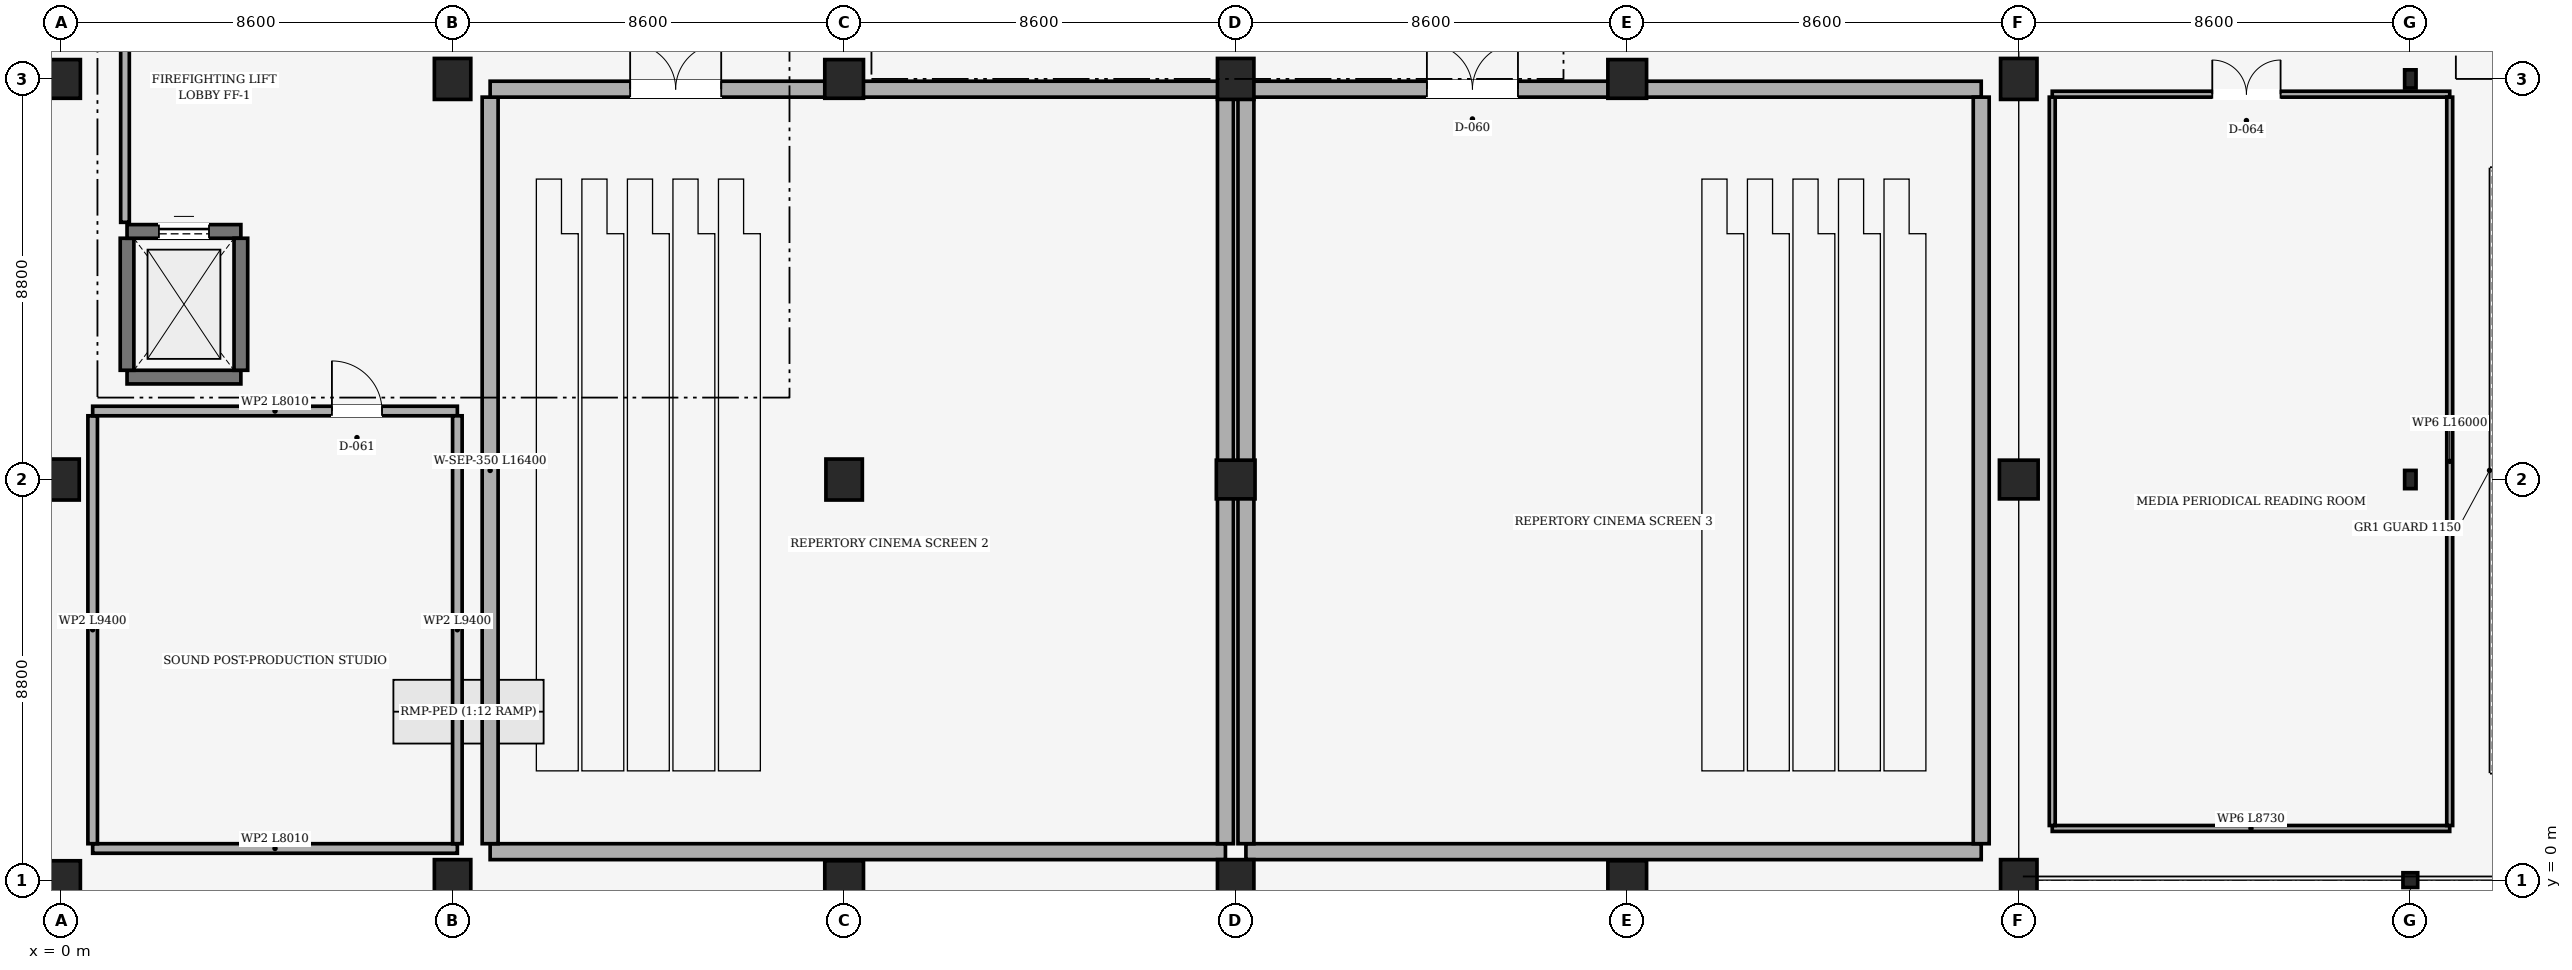
"""IFC4 building model, lengths in metres.
Left out: names, types, materials, properties, quantities, classifications, styles, units other than length and angle.
Written with IfcOpenShell. Run it as: python <this file> out.ifc"""

import sys

from ifc_helpers import new_model, si_unit, direction, frame, frame_2d, origin, origin_with_axes, origin_2d, place, context, subcontext, project, spatial, rectangle, hollow_circle, i_section, extrude, element, fill, save


model = new_model("IFC4")
c1 = context("Model", 3, precision=1e-05, world=origin(), true_north=direction((0.0, 1.0)))
c2 = subcontext(c1, "Body", "Model", "MODEL_VIEW")
j1 = project(units=[si_unit("LENGTHUNIT", "METRE"), si_unit("PLANEANGLEUNIT", "RADIAN")], contexts=[c1])
p1 = place(None, origin())
s1 = spatial("IfcSite", under=j1, at=p1, CompositionType="ELEMENT")
p2 = place(p1, origin())
s2 = spatial("IfcBuilding", under=s1, at=p2, CompositionType="ELEMENT")
p3 = place(p2, frame((0.0, 0.0, 4.5)))
s3 = spatial("IfcBuildingStorey", under=s2, at=p3, CompositionType="ELEMENT", Elevation=4.5)
p4 = place(p3, origin_with_axes())
e1 = element("IfcColumn", 1, at=p4, inside=s3, PredefinedType="COLUMN", context=c2, shape_type="SweptSolid", body=[
    extrude(rectangle(XDim=0.85, YDim=0.85, at=origin_2d()), origin(), (0.0, 0.0, 1.0), 3.65),
])
p5 = place(p3, frame((0.0, 8.8, 0.0), z_axis=(0.0, 0.0, 1.0), x_axis=(1.0, 0.0, 0.0)))
e2 = element("IfcColumn", 2, at=p5, inside=s3, PredefinedType="COLUMN", context=c2, shape_type="SweptSolid", body=[
    extrude(rectangle(XDim=0.8, YDim=0.9, at=origin_2d()), origin(), (0.0, 0.0, 1.0), 3.65),
])
p6 = place(p3, frame((0.0, 17.6, 0.0), z_axis=(0.0, 0.0, 1.0), x_axis=(1.0, 0.0, 0.0)))
e3 = element("IfcColumn", 3, at=p6, inside=s3, PredefinedType="COLUMN", context=c2, shape_type="SweptSolid", body=[
    extrude(rectangle(XDim=0.85, YDim=0.85, at=origin_2d()), origin(), (0.0, 0.0, 1.0), 3.65),
])
for number, where, z_axis, x_axis in (
    (4, (8.6, 0.0, 0.0), (0.0, 0.0, 1.0), (1.0, 0.0, 0.0)),
    (5, (8.6, 17.6, 0.0), (0.0, 0.0, 1.0), (1.0, 0.0, 0.0)),
):
    element("IfcColumn", number, at=place(p3, frame(where, z_axis=z_axis, x_axis=x_axis)), inside=s3, PredefinedType="COLUMN", context=c2, shape_type="SweptSolid", body=[
        extrude(rectangle(XDim=0.8, YDim=0.9, at=origin_2d()), origin(), (0.0, 0.0, 1.0), 3.65),
    ])
p7 = place(p3, frame((17.2, 0.0, 0.0), z_axis=(0.0, 0.0, 1.0), x_axis=(1.0, 0.0, 0.0)))
e6 = element("IfcColumn", 6, at=p7, inside=s3, PredefinedType="COLUMN", context=c2, shape_type="SweptSolid", body=[
    extrude(rectangle(XDim=0.85, YDim=0.85, at=origin_2d()), origin(), (0.0, 0.0, 1.0), 3.65),
])
p8 = place(p3, frame((17.2, 8.8, 0.0), z_axis=(0.0, 0.0, 1.0), x_axis=(1.0, 0.0, 0.0)))
e7 = element("IfcColumn", 7, at=p8, inside=s3, PredefinedType="COLUMN", context=c2, shape_type="SweptSolid", body=[
    extrude(rectangle(XDim=0.8, YDim=0.9, at=origin_2d()), origin(), (0.0, 0.0, 1.0), 3.65),
])
p9 = place(p3, frame((17.2, 17.6, 0.0), z_axis=(0.0, 0.0, 1.0), x_axis=(1.0, 0.0, 0.0)))
e8 = element("IfcColumn", 8, at=p9, inside=s3, PredefinedType="COLUMN", context=c2, shape_type="SweptSolid", body=[
    extrude(rectangle(XDim=0.85, YDim=0.85, at=origin_2d()), origin(), (0.0, 0.0, 1.0), 3.65),
])
p10 = place(p3, frame((25.8, 0.0, 0.0), z_axis=(0.0, 0.0, 1.0), x_axis=(1.0, 0.0, 0.0)))
e9 = element("IfcColumn", 9, at=p10, inside=s3, PredefinedType="COLUMN", context=c2, shape_type="SweptSolid", body=[
    extrude(rectangle(XDim=0.8, YDim=0.9, at=origin_2d()), origin(), (0.0, 0.0, 1.0), 3.65),
])
p11 = place(p3, frame((25.8, 8.8, 0.0), z_axis=(0.0, 0.0, 1.0), x_axis=(1.0, 0.0, 0.0)))
e10 = element("IfcColumn", 10, at=p11, inside=s3, PredefinedType="COLUMN", context=c2, shape_type="SweptSolid", body=[
    extrude(rectangle(XDim=0.85, YDim=0.85, at=origin_2d()), origin(), (0.0, 0.0, 1.0), 3.65),
])
p12 = place(p3, frame((25.8, 17.6, 0.0), z_axis=(0.0, 0.0, 1.0), x_axis=(1.0, 0.0, 0.0)))
e11 = element("IfcColumn", 11, at=p12, inside=s3, PredefinedType="COLUMN", context=c2, shape_type="SweptSolid", body=[
    extrude(rectangle(XDim=0.8, YDim=0.9, at=origin_2d()), origin(), (0.0, 0.0, 1.0), 3.65),
])
for number, where, z_axis, x_axis in (
    (12, (34.4, 0.0, 0.0), (0.0, 0.0, 1.0), (1.0, 0.0, 0.0)),
    (13, (34.4, 17.6, 0.0), (0.0, 0.0, 1.0), (1.0, 0.0, 0.0)),
):
    element("IfcColumn", number, at=place(p3, frame(where, z_axis=z_axis, x_axis=x_axis)), inside=s3, PredefinedType="COLUMN", context=c2, shape_type="SweptSolid", body=[
        extrude(rectangle(XDim=0.85, YDim=0.85, at=origin_2d()), origin(), (0.0, 0.0, 1.0), 3.65),
    ])
p13 = place(p3, frame((43.0, 0.0, 0.0), z_axis=(0.0, 0.0, 1.0), x_axis=(1.0, 0.0, 0.0)))
e14 = element("IfcColumn", 14, at=p13, inside=s3, PredefinedType="COLUMN", context=c2, shape_type="SweptSolid", body=[
    extrude(rectangle(XDim=0.8, YDim=0.9, at=origin_2d()), origin(), (0.0, 0.0, 1.0), 3.65),
])
p14 = place(p3, frame((43.0, 8.8, 0.0), z_axis=(0.0, 0.0, 1.0), x_axis=(1.0, 0.0, 0.0)))
e15 = element("IfcColumn", 15, at=p14, inside=s3, PredefinedType="COLUMN", context=c2, shape_type="SweptSolid", body=[
    extrude(rectangle(XDim=0.85, YDim=0.85, at=origin_2d()), origin(), (0.0, 0.0, 1.0), 3.65),
])
p15 = place(p3, frame((43.0, 17.6, 0.0), z_axis=(0.0, 0.0, 1.0), x_axis=(1.0, 0.0, 0.0)))
e16 = element("IfcColumn", 16, at=p15, inside=s3, PredefinedType="COLUMN", context=c2, shape_type="SweptSolid", body=[
    extrude(rectangle(XDim=0.8, YDim=0.9, at=origin_2d()), origin(), (0.0, 0.0, 1.0), 3.65),
])
p16 = place(p3, frame((51.6, 0.0, 0.0), z_axis=(0.0, 0.0, 1.0), x_axis=(1.0, 0.0, 0.0)))
e17 = element("IfcColumn", 17, at=p16, inside=s3, PredefinedType="COLUMN", context=c2, shape_type="SweptSolid", body=[
    extrude(hollow_circle(Radius=0.162, WallThickness=0.01, at=origin_2d()), origin(), (0.0, 0.0, 1.0), 3.65),
])
for number, where, z_axis, x_axis in (
    (18, (51.6, 8.8, 0.0), (0.0, 0.0, 1.0), (1.0, 0.0, 0.0)),
    (19, (51.6, 17.6, 0.0), (0.0, 0.0, 1.0), (1.0, 0.0, 0.0)),
):
    element("IfcColumn", number, at=place(p3, frame(where, z_axis=z_axis, x_axis=x_axis)), inside=s3, PredefinedType="COLUMN", context=c2, shape_type="SweptSolid", body=[
        extrude(i_section(OverallWidth=0.25, OverallDepth=0.4, WebThickness=0.01, FlangeThickness=0.013, FilletRadius=0.012, at=origin_2d()), origin(), (0.0, 0.0, 1.0), 3.65),
    ])
p17 = place(p3, frame((3.95, 11.05, 0.0), z_axis=(0.0, 0.0, 1.0), x_axis=(-1.0, 0.0, 0.0)))
e20 = element("IfcWall", 20, at=p17, inside=s3, PredefinedType="SHEAR", context=c2, shape_type="SweptSolid", body=[
    extrude(rectangle(XDim=2.5, YDim=0.3, at=frame_2d((1.25, 0.0))), origin(), (0.0, 0.0, 1.0), 3.65),
])
p18 = place(p3, frame((1.45, 11.2, 0.0), z_axis=(0.0, 0.0, 1.0), x_axis=(0.0, 1.0, 0.0)))
e21 = element("IfcWall", 21, at=p18, inside=s3, PredefinedType="SHEAR", context=c2, shape_type="SweptSolid", body=[
    extrude(rectangle(XDim=2.9, YDim=0.3, at=frame_2d((1.45, 0.0))), origin(), (0.0, 0.0, 1.0), 3.65),
])
p19 = place(p3, frame((1.45, 14.25, 0.0), z_axis=(0.0, 0.0, 1.0), x_axis=(1.0, 0.0, 0.0)))
e22 = element("IfcWall", 22, at=p19, inside=s3, PredefinedType="SHEAR", context=c2, shape_type="SweptSolid", body=[
    extrude(rectangle(XDim=2.5, YDim=0.3, at=frame_2d((1.25, 0.0))), origin(), (0.0, 0.0, 1.0), 3.65),
])
p20 = place(p19, frame((0.7, 0.0, 0.0)))
e23 = element("IfcOpeningElement", 23, at=p20, cuts=e22, PredefinedType="OPENING", context=c2, shape_type="SweptSolid", body=[
    extrude(rectangle(XDim=1.1, YDim=2.1, at=frame_2d((0.55, 1.05))), frame((0.0, 0.15, 0.0), z_axis=(0.0, -1.0, 0.0), x_axis=(1.0, 0.0, 0.0)), (0.0, 0.0, 1.0), 0.3),
])
p21 = place(p3, frame((3.95, 14.1, 0.0), z_axis=(0.0, 0.0, 1.0), x_axis=(0.0, -1.0, 0.0)))
e24 = element("IfcWall", 24, at=p21, inside=s3, PredefinedType="SHEAR", context=c2, shape_type="SweptSolid", body=[
    extrude(rectangle(XDim=2.9, YDim=0.3, at=frame_2d((1.45, 0.0))), origin(), (0.0, 0.0, 1.0), 3.65),
])
p22 = place(p3, frame((1.405, 14.45, 0.0), z_axis=(0.0, 0.0, 1.0), x_axis=(0.0, 1.0, 0.0)))
e25 = element("IfcWall", 25, at=p22, inside=s3, PredefinedType="PARTITIONING", context=c2, shape_type="SweptSolid", body=[
    extrude(rectangle(XDim=8.35, YDim=0.19, at=frame_2d((4.175, 0.0))), origin(), (0.0, 0.0, 1.0), 3.63),
])
p23 = place(p3, frame((25.575, 0.625, 0.0), z_axis=(0.0, 0.0, 1.0), x_axis=(-1.0, 0.0, 0.0)))
e26 = element("IfcWall", 26, at=p23, inside=s3, PredefinedType="SOLIDWALL", context=c2, shape_type="SweptSolid", body=[
    extrude(rectangle(XDim=16.15, YDim=0.35, at=frame_2d((8.075, 0.0))), origin(), (0.0, 0.0, 1.0), 3.63),
])
p24 = place(p3, frame((9.425, 0.8, 0.0), z_axis=(0.0, 0.0, 1.0), x_axis=(0.0, 1.0, 0.0)))
e27 = element("IfcWall", 27, at=p24, inside=s3, PredefinedType="SOLIDWALL", context=c2, shape_type="SweptSolid", body=[
    extrude(rectangle(XDim=16.4, YDim=0.35, at=frame_2d((8.2, 0.0))), origin(), (0.0, 0.0, 1.0), 3.63),
])
p25 = place(p3, frame((9.425, 17.375, 0.0), z_axis=(0.0, 0.0, 1.0), x_axis=(1.0, 0.0, 0.0)))
e28 = element("IfcWall", 28, at=p25, inside=s3, PredefinedType="SOLIDWALL", context=c2, shape_type="SweptSolid", body=[
    extrude(rectangle(XDim=16.15, YDim=0.35, at=frame_2d((8.075, 0.0))), origin(), (0.0, 0.0, 1.0), 2.83),
])
p26 = place(p25, frame((3.075, 0.0, 0.0)))
e29 = element("IfcOpeningElement", 29, at=p26, cuts=e28, PredefinedType="OPENING", context=c2, shape_type="SweptSolid", body=[
    extrude(rectangle(XDim=2.0, YDim=2.25, at=frame_2d((1.0, 1.125))), frame((0.0, 0.175, 0.0), z_axis=(0.0, -1.0, 0.0), x_axis=(1.0, 0.0, 0.0)), (0.0, 0.0, 1.0), 0.35),
])
p27 = place(p3, frame((25.575, 17.2, 0.0), z_axis=(0.0, 0.0, 1.0), x_axis=(0.0, -1.0, 0.0)))
e30 = element("IfcWall", 30, at=p27, inside=s3, PredefinedType="SOLIDWALL", context=c2, shape_type="SweptSolid", body=[
    extrude(rectangle(XDim=16.4, YDim=0.35, at=frame_2d((8.2, 0.0))), origin(), (0.0, 0.0, 1.0), 2.83),
])
p28 = place(p3, frame((42.175, 0.625, 0.0), z_axis=(0.0, 0.0, 1.0), x_axis=(-1.0, 0.0, 0.0)))
e31 = element("IfcWall", 31, at=p28, inside=s3, PredefinedType="SOLIDWALL", context=c2, shape_type="SweptSolid", body=[
    extrude(rectangle(XDim=16.15, YDim=0.35, at=frame_2d((8.075, 0.0))), origin(), (0.0, 0.0, 1.0), 3.63),
])
p29 = place(p3, frame((26.025, 0.8, 0.0), z_axis=(0.0, 0.0, 1.0), x_axis=(0.0, 1.0, 0.0)))
e32 = element("IfcWall", 32, at=p29, inside=s3, PredefinedType="SOLIDWALL", context=c2, shape_type="SweptSolid", body=[
    extrude(rectangle(XDim=16.4, YDim=0.35, at=frame_2d((8.2, 0.0))), origin(), (0.0, 0.0, 1.0), 2.83),
])
p30 = place(p3, frame((26.025, 17.375, 0.0), z_axis=(0.0, 0.0, 1.0), x_axis=(1.0, 0.0, 0.0)))
e33 = element("IfcWall", 33, at=p30, inside=s3, PredefinedType="SOLIDWALL", context=c2, shape_type="SweptSolid", body=[
    extrude(rectangle(XDim=16.15, YDim=0.35, at=frame_2d((8.075, 0.0))), origin(), (0.0, 0.0, 1.0), 2.83),
])
p31 = place(p30, frame((3.975, 0.0, 0.0)))
e34 = element("IfcOpeningElement", 34, at=p31, cuts=e33, PredefinedType="OPENING", context=c2, shape_type="SweptSolid", body=[
    extrude(rectangle(XDim=2.0, YDim=2.25, at=frame_2d((1.0, 1.125))), frame((0.0, 0.175, 0.0), z_axis=(0.0, -1.0, 0.0), x_axis=(1.0, 0.0, 0.0)), (0.0, 0.0, 1.0), 0.35),
])
p32 = place(p3, frame((42.175, 17.2, 0.0), z_axis=(0.0, 0.0, 1.0), x_axis=(0.0, -1.0, 0.0)))
e35 = element("IfcWall", 35, at=p32, inside=s3, PredefinedType="SOLIDWALL", context=c2, shape_type="SweptSolid", body=[
    extrude(rectangle(XDim=16.4, YDim=0.35, at=frame_2d((8.2, 0.0))), origin(), (0.0, 0.0, 1.0), 3.63),
])
p33 = place(p3, frame((8.705, 0.695, 0.0), z_axis=(0.0, 0.0, 1.0), x_axis=(-1.0, 0.0, 0.0)))
e36 = element("IfcWall", 36, at=p33, inside=s3, PredefinedType="PARTITIONING", context=c2, shape_type="SweptSolid", body=[
    extrude(rectangle(XDim=8.01, YDim=0.21, at=frame_2d((4.005, 0.0))), origin(), (0.0, 0.0, 1.0), 3.63),
])
p34 = place(p3, frame((0.695, 0.8, 0.0), z_axis=(0.0, 0.0, 1.0), x_axis=(0.0, 1.0, 0.0)))
e37 = element("IfcWall", 37, at=p34, inside=s3, PredefinedType="PARTITIONING", context=c2, shape_type="SweptSolid", body=[
    extrude(rectangle(XDim=9.4, YDim=0.21, at=frame_2d((4.7, 0.0))), origin(), (0.0, 0.0, 1.0), 3.63),
])
p35 = place(p3, frame((0.695, 10.305, 0.0), z_axis=(0.0, 0.0, 1.0), x_axis=(1.0, 0.0, 0.0)))
e38 = element("IfcWall", 38, at=p35, inside=s3, PredefinedType="PARTITIONING", context=c2, shape_type="SweptSolid", body=[
    extrude(rectangle(XDim=8.01, YDim=0.21, at=frame_2d((4.005, 0.0))), origin(), (0.0, 0.0, 1.0), 3.63),
])
p36 = place(p35, frame((5.255, 0.0, 0.0)))
e39 = element("IfcOpeningElement", 39, at=p36, cuts=e38, PredefinedType="OPENING", context=c2, shape_type="SweptSolid", body=[
    extrude(rectangle(XDim=1.1, YDim=2.1, at=frame_2d((0.55, 1.05))), frame((0.0, 0.105, 0.0), z_axis=(0.0, -1.0, 0.0), x_axis=(1.0, 0.0, 0.0)), (0.0, 0.0, 1.0), 0.21),
])
p37 = place(p3, frame((8.705, 10.2, 0.0), z_axis=(0.0, 0.0, 1.0), x_axis=(0.0, -1.0, 0.0)))
e40 = element("IfcWall", 40, at=p37, inside=s3, PredefinedType="PARTITIONING", context=c2, shape_type="SweptSolid", body=[
    extrude(rectangle(XDim=9.4, YDim=0.21, at=frame_2d((4.7, 0.0))), origin(), (0.0, 0.0, 1.0), 2.88),
])
p38 = place(p3, frame((52.465, 1.135, 0.0), z_axis=(0.0, 0.0, 1.0), x_axis=(-1.0, 0.0, 0.0)))
e41 = element("IfcWall", 41, at=p38, inside=s3, PredefinedType="PARTITIONING", context=c2, shape_type="SweptSolid", body=[
    extrude(rectangle(XDim=8.73, YDim=0.13, at=frame_2d((4.365, 0.0))), origin(), (0.0, 0.0, 1.0), 3.63),
])
p39 = place(p3, frame((43.735, 1.2, 0.0), z_axis=(0.0, 0.0, 1.0), x_axis=(0.0, 1.0, 0.0)))
e42 = element("IfcWall", 42, at=p39, inside=s3, PredefinedType="PARTITIONING", context=c2, shape_type="SweptSolid", body=[
    extrude(rectangle(XDim=16.0, YDim=0.13, at=frame_2d((8.0, 0.0))), origin(), (0.0, 0.0, 1.0), 3.63),
])
p40 = place(p3, frame((43.735, 17.265, 0.0), z_axis=(0.0, 0.0, 1.0), x_axis=(1.0, 0.0, 0.0)))
e43 = element("IfcWall", 43, at=p40, inside=s3, PredefinedType="PARTITIONING", context=c2, shape_type="SweptSolid", body=[
    extrude(rectangle(XDim=8.73, YDim=0.13, at=frame_2d((4.365, 0.0))), origin(), (0.0, 0.0, 1.0), 2.88),
])
p41 = place(p40, frame((3.515, 0.0, 0.0)))
e44 = element("IfcOpeningElement", 44, at=p41, cuts=e43, PredefinedType="OPENING", context=c2, shape_type="SweptSolid", body=[
    extrude(rectangle(XDim=1.5, YDim=2.2, at=frame_2d((0.75, 1.1))), frame((0.0, 0.065, 0.0), z_axis=(0.0, -1.0, 0.0), x_axis=(1.0, 0.0, 0.0)), (0.0, 0.0, 1.0), 0.13),
])
p42 = place(p3, frame((52.465, 17.2, 0.0), z_axis=(0.0, 0.0, 1.0), x_axis=(0.0, -1.0, 0.0)))
e45 = element("IfcWall", 45, at=p42, inside=s3, PredefinedType="PARTITIONING", context=c2, shape_type="SweptSolid", body=[
    extrude(rectangle(XDim=16.0, YDim=0.13, at=frame_2d((8.0, 0.0))), origin(), (0.0, 0.0, 1.0), 3.63),
])
p43 = place(p20, origin())
e46 = element("IfcDoor", 46, at=p43, inside=s3, OperationType="SLIDING_TO_LEFT", PredefinedType="DOOR", context=c2, shape_type="SweptSolid", body=[
    extrude(rectangle(XDim=1.1, YDim=2.1, at=frame_2d((0.55, 1.05))), frame((0.0, 0.025, 0.0), z_axis=(0.0, -1.0, 0.0), x_axis=(1.0, 0.0, 0.0)), (0.0, 0.0, 1.0), 0.05),
])
fill(e23, e46)
p44 = place(p26, origin())
e47 = element("IfcDoor", 47, at=p44, inside=s3, OperationType="DOUBLE_DOOR_SINGLE_SWING", PredefinedType="DOOR", context=c2, shape_type="SweptSolid", body=[
    extrude(rectangle(XDim=2.0, YDim=2.25, at=frame_2d((1.0, 1.125))), frame((0.0, 0.025, 0.0), z_axis=(0.0, -1.0, 0.0), x_axis=(1.0, 0.0, 0.0)), (0.0, 0.0, 1.0), 0.05),
])
fill(e29, e47)
p45 = place(p31, origin())
e48 = element("IfcDoor", 48, at=p45, inside=s3, OperationType="DOUBLE_DOOR_SINGLE_SWING", PredefinedType="DOOR", context=c2, shape_type="SweptSolid", body=[
    extrude(rectangle(XDim=2.0, YDim=2.25, at=frame_2d((1.0, 1.125))), frame((0.0, 0.025, 0.0), z_axis=(0.0, -1.0, 0.0), x_axis=(1.0, 0.0, 0.0)), (0.0, 0.0, 1.0), 0.05),
])
fill(e34, e48)
p46 = place(p36, origin())
e49 = element("IfcDoor", 49, at=p46, inside=s3, OperationType="SINGLE_SWING_LEFT", PredefinedType="DOOR", context=c2, shape_type="SweptSolid", body=[
    extrude(rectangle(XDim=1.1, YDim=2.1, at=frame_2d((0.55, 1.05))), frame((0.0, 0.025, 0.0), z_axis=(0.0, -1.0, 0.0), x_axis=(1.0, 0.0, 0.0)), (0.0, 0.0, 1.0), 0.05),
])
fill(e39, e49)
p47 = place(p41, origin())
e50 = element("IfcDoor", 50, at=p47, inside=s3, OperationType="DOUBLE_DOOR_SINGLE_SWING", PredefinedType="DOOR", context=c2, shape_type="SweptSolid", body=[
    extrude(rectangle(XDim=1.5, YDim=2.2, at=frame_2d((0.75, 1.1))), frame((0.0, 0.025, 0.0), z_axis=(0.0, -1.0, 0.0), x_axis=(1.0, 0.0, 0.0)), (0.0, 0.0, 1.0), 0.05),
])
fill(e44, e50)
save(model, sys.argv[1])
